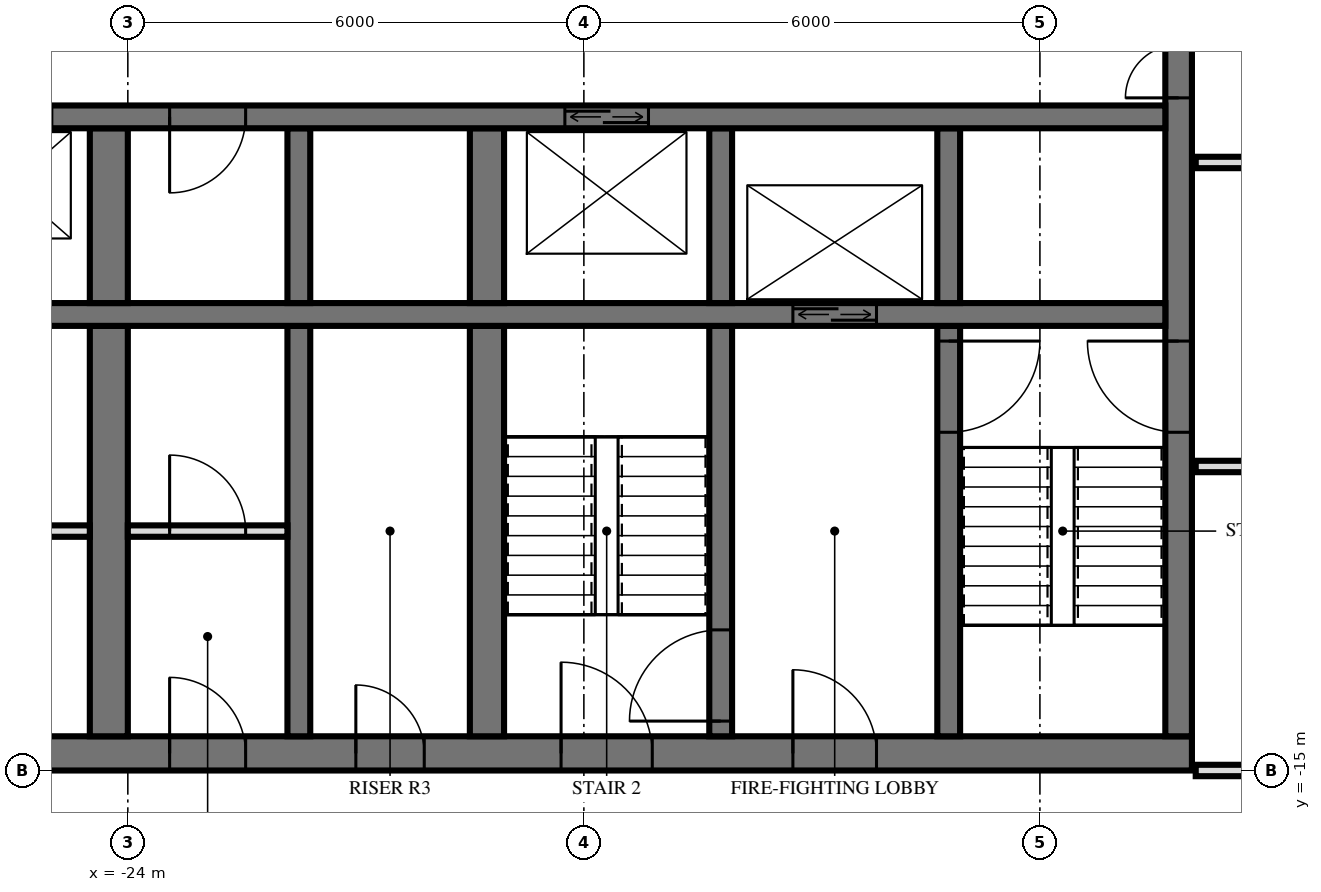
"""IFC4 building model, lengths in metres.
Left out: names, types, materials, properties, quantities, classifications, styles, units other than length and angle.
Written with IfcOpenShell. Run it as: python <this file> out.ifc"""

import sys

from ifc_helpers import new_model, si_unit, direction, frame, frame_2d, origin, place, context, subcontext, project, spatial, rectangle, extrude, element, fill, save


model = new_model("IFC4")
c1 = context("Model", 3, precision=1e-05, world=origin(), true_north=direction((0.0, 1.0)))
c2 = subcontext(c1, "Body", "Model", "MODEL_VIEW")
j1 = project(units=[si_unit("LENGTHUNIT", "METRE"), si_unit("PLANEANGLEUNIT", "RADIAN")], contexts=[c1])
p1 = place(None, origin())
s1 = spatial("IfcSite", under=j1, at=p1, CompositionType="ELEMENT")
p2 = place(p1, origin())
s2 = spatial("IfcBuilding", under=s1, at=p2, CompositionType="ELEMENT")
p3 = place(p2, frame((0.0, 0.0, 63.6)))
s3 = spatial("IfcBuildingStorey", under=s2, at=p3, CompositionType="ELEMENT", Elevation=63.6)
p4 = place(p3, frame((-29.5, -14.775, 0.0), z_axis=(0.0, 0.0, 1.0), x_axis=(1.0, 0.0, 0.0)))
e1 = element("IfcWall", 1, at=p4, inside=s3, PredefinedType="SHEAR", context=c2, shape_type="SweptSolid", body=[
    extrude(rectangle(XDim=19.5, YDim=0.45, at=frame_2d((9.75, 0.0))), origin(), (0.0, 0.0, 1.0), 3.6),
])
p5 = place(p4, frame((11.2, 0.0, 0.0)))
e2 = element("IfcOpeningElement", 2, at=p5, cuts=e1, PredefinedType="OPENING", context=c2, shape_type="SweptSolid", body=[
    extrude(rectangle(XDim=1.2, YDim=2.1, at=frame_2d((0.6, 1.05))), frame((0.0, 0.235, 0.0), z_axis=(0.0, -1.0, 0.0), x_axis=(1.0, 0.0, 0.0)), (0.0, 0.0, 1.0), 0.47),
])
p6 = place(p4, frame((14.25, 0.0, 0.0)))
e3 = element("IfcOpeningElement", 3, at=p6, cuts=e1, PredefinedType="OPENING", context=c2, shape_type="SweptSolid", body=[
    extrude(rectangle(XDim=1.1, YDim=2.1, at=frame_2d((0.55, 1.05))), frame((0.0, 0.235, 0.0), z_axis=(0.0, -1.0, 0.0), x_axis=(1.0, 0.0, 0.0)), (0.0, 0.0, 1.0), 0.47),
])
p7 = place(p4, frame((8.5, 0.0, 0.0)))
e4 = element("IfcOpeningElement", 4, at=p7, cuts=e1, PredefinedType="OPENING", context=c2, shape_type="SweptSolid", body=[
    extrude(rectangle(XDim=0.9, YDim=2.1, at=frame_2d((0.45, 1.05))), frame((0.0, 0.235, 0.0), z_axis=(0.0, -1.0, 0.0), x_axis=(1.0, 0.0, 0.0)), (0.0, 0.0, 1.0), 0.47),
])
p8 = place(p4, frame((6.05, 0.0, 0.0)))
e5 = element("IfcOpeningElement", 5, at=p8, cuts=e1, PredefinedType="OPENING", context=c2, shape_type="SweptSolid", body=[
    extrude(rectangle(XDim=1.0, YDim=2.1, at=frame_2d((0.5, 1.05))), frame((0.0, 0.235, 0.0), z_axis=(0.0, -1.0, 0.0), x_axis=(1.0, 0.0, 0.0)), (0.0, 0.0, 1.0), 0.47),
])
p9 = place(p4, frame((2.25, 0.0, 0.0)))
e6 = element("IfcOpeningElement", 6, at=p9, cuts=e1, PredefinedType="OPENING", context=c2, shape_type="SweptSolid", body=[
    extrude(rectangle(XDim=1.0, YDim=2.1, at=frame_2d((0.5, 1.05))), frame((0.0, 0.235, 0.0), z_axis=(0.0, -1.0, 0.0), x_axis=(1.0, 0.0, 0.0)), (0.0, 0.0, 1.0), 0.47),
])
p10 = place(p3, frame((-10.175, -14.55, 0.0), z_axis=(0.0, 0.0, 1.0), x_axis=(0.0, 1.0, 0.0)))
e7 = element("IfcWall", 7, at=p10, inside=s3, PredefinedType="SHEAR", context=c2, shape_type="SweptSolid", body=[
    extrude(rectangle(XDim=14.1, YDim=0.35, at=frame_2d((7.05, 0.0))), origin(), (0.0, 0.0, 1.0), 3.6),
])
p11 = place(p10, frame((8.4, 0.0, 0.0)))
e8 = element("IfcOpeningElement", 8, at=p11, cuts=e7, PredefinedType="OPENING", context=c2, shape_type="SweptSolid", body=[
    extrude(rectangle(XDim=1.4, YDim=2.4, at=frame_2d((0.7, 1.2))), frame((0.0, 0.185, 0.0), z_axis=(0.0, -1.0, 0.0), x_axis=(1.0, 0.0, 0.0)), (0.0, 0.0, 1.0), 0.37),
])
p12 = place(p10, frame((10.0, 0.0, 0.0)))
e9 = element("IfcOpeningElement", 9, at=p12, cuts=e7, PredefinedType="OPENING", context=c2, shape_type="SweptSolid", body=[
    extrude(rectangle(XDim=1.4, YDim=2.4, at=frame_2d((0.7, 1.2))), frame((0.0, 0.185, 0.0), z_axis=(0.0, -1.0, 0.0), x_axis=(1.0, 0.0, 0.0)), (0.0, 0.0, 1.0), 0.37),
])
p13 = place(p10, frame((4.0, 0.0, 0.0)))
e10 = element("IfcOpeningElement", 10, at=p13, cuts=e7, PredefinedType="OPENING", context=c2, shape_type="SweptSolid", body=[
    extrude(rectangle(XDim=1.2, YDim=2.1, at=frame_2d((0.6, 1.05))), frame((0.0, 0.185, 0.0), z_axis=(0.0, -1.0, 0.0), x_axis=(1.0, 0.0, 0.0)), (0.0, 0.0, 1.0), 0.37),
])
p14 = place(p3, frame((-29.05, -6.4, 0.0), z_axis=(0.0, 0.0, 1.0), x_axis=(1.0, 0.0, 0.0)))
e11 = element("IfcWall", 11, at=p14, inside=s3, PredefinedType="SHEAR", context=c2, shape_type="SweptSolid", body=[
    extrude(rectangle(XDim=18.7, YDim=0.3, at=frame_2d((9.35, 0.0))), origin(), (0.0, 0.0, 1.0), 3.6),
])
p15 = place(p14, frame((2.95, 0.0, 0.0)))
e12 = element("IfcOpeningElement", 12, at=p15, cuts=e11, PredefinedType="OPENING", context=c2, shape_type="SweptSolid", body=[
    extrude(rectangle(XDim=1.1, YDim=2.1, at=frame_2d((0.55, 1.05))), frame((0.0, 0.16, 0.0), z_axis=(0.0, -1.0, 0.0), x_axis=(1.0, 0.0, 0.0)), (0.0, 0.0, 1.0), 0.32),
])
p16 = place(p14, frame((0.55, 0.0, 0.0)))
e13 = element("IfcOpeningElement", 13, at=p16, cuts=e11, PredefinedType="OPENING", context=c2, shape_type="SweptSolid", body=[
    extrude(rectangle(XDim=1.1, YDim=2.1, at=frame_2d((0.55, 1.05))), frame((0.0, 0.16, 0.0), z_axis=(0.0, -1.0, 0.0), x_axis=(1.0, 0.0, 0.0)), (0.0, 0.0, 1.0), 0.32),
])
p17 = place(p14, frame((10.8, 0.0, 0.0)))
e14 = element("IfcOpeningElement", 14, at=p17, cuts=e11, PredefinedType="OPENING", context=c2, shape_type="SweptSolid", body=[
    extrude(rectangle(XDim=1.1, YDim=2.1, at=frame_2d((0.55, 1.05))), frame((0.0, 0.16, 0.0), z_axis=(0.0, -1.0, 0.0), x_axis=(1.0, 0.0, 0.0)), (0.0, 0.0, 1.0), 0.32),
])
p18 = place(p14, frame((5.6, 0.0, 0.0)))
e15 = element("IfcOpeningElement", 15, at=p18, cuts=e11, PredefinedType="OPENING", context=c2, shape_type="SweptSolid", body=[
    extrude(rectangle(XDim=1.0, YDim=2.1, at=frame_2d((0.5, 1.05))), frame((0.0, 0.16, 0.0), z_axis=(0.0, -1.0, 0.0), x_axis=(1.0, 0.0, 0.0)), (0.0, 0.0, 1.0), 0.32),
])
p19 = place(p3, frame((-29.05, -9.0, 0.0), z_axis=(0.0, 0.0, 1.0), x_axis=(1.0, 0.0, 0.0)))
e16 = element("IfcWall", 16, at=p19, inside=s3, PredefinedType="SHEAR", context=c2, shape_type="SweptSolid", body=[
    extrude(rectangle(XDim=18.7, YDim=0.3, at=frame_2d((9.35, 0.0))), origin(), (0.0, 0.0, 1.0), 3.6),
])
p20 = place(p19, frame((13.8, 0.0, 0.0)))
e17 = element("IfcOpeningElement", 17, at=p20, cuts=e16, PredefinedType="OPENING", context=c2, shape_type="SweptSolid", body=[
    extrude(rectangle(XDim=1.1, YDim=2.1, at=frame_2d((0.55, 1.05))), frame((0.0, 0.16, 0.0), z_axis=(0.0, -1.0, 0.0), x_axis=(1.0, 0.0, 0.0)), (0.0, 0.0, 1.0), 0.32),
])
p21 = place(p3, frame((-13.2, -8.85, 0.0), z_axis=(0.0, 0.0, 1.0), x_axis=(0.0, 1.0, 0.0)))
e18 = element("IfcWall", 18, at=p21, inside=s3, PredefinedType="SHEAR", context=c2, shape_type="SweptSolid", body=[
    extrude(rectangle(XDim=2.3, YDim=0.3, at=frame_2d((1.15, 0.0))), origin(), (0.0, 0.0, 1.0), 3.6),
])
p22 = place(p3, frame((-13.2, -14.55, 0.0), z_axis=(0.0, 0.0, 1.0), x_axis=(0.0, 1.0, 0.0)))
e19 = element("IfcWall", 19, at=p22, inside=s3, PredefinedType="SHEAR", context=c2, shape_type="SweptSolid", body=[
    extrude(rectangle(XDim=5.4, YDim=0.3, at=frame_2d((2.7, 0.0))), origin(), (0.0, 0.0, 1.0), 3.6),
])
p23 = place(p22, frame((4.0, 0.0, 0.0)))
e20 = element("IfcOpeningElement", 20, at=p23, cuts=e19, PredefinedType="OPENING", context=c2, shape_type="SweptSolid", body=[
    extrude(rectangle(XDim=1.2, YDim=2.1, at=frame_2d((0.6, 1.05))), frame((0.0, 0.16, 0.0), z_axis=(0.0, -1.0, 0.0), x_axis=(1.0, 0.0, 0.0)), (0.0, 0.0, 1.0), 0.32),
])
p24 = place(p3, frame((-16.2, -8.85, 0.0), z_axis=(0.0, 0.0, 1.0), x_axis=(0.0, 1.0, 0.0)))
e21 = element("IfcWall", 21, at=p24, inside=s3, PredefinedType="SHEAR", context=c2, shape_type="SweptSolid", body=[
    extrude(rectangle(XDim=2.3, YDim=0.3, at=frame_2d((1.15, 0.0))), origin(), (0.0, 0.0, 1.0), 3.6),
])
p25 = place(p3, frame((-16.2, -14.55, 0.0), z_axis=(0.0, 0.0, 1.0), x_axis=(0.0, 1.0, 0.0)))
e22 = element("IfcWall", 22, at=p25, inside=s3, PredefinedType="SHEAR", context=c2, shape_type="SweptSolid", body=[
    extrude(rectangle(XDim=5.4, YDim=0.3, at=frame_2d((2.7, 0.0))), origin(), (0.0, 0.0, 1.0), 3.6),
])
p26 = place(p25, frame((0.2, 0.0, 0.0)))
e23 = element("IfcOpeningElement", 23, at=p26, cuts=e22, PredefinedType="OPENING", context=c2, shape_type="SweptSolid", body=[
    extrude(rectangle(XDim=1.2, YDim=2.1, at=frame_2d((0.6, 1.05))), frame((0.0, 0.16, 0.0), z_axis=(0.0, -1.0, 0.0), x_axis=(1.0, 0.0, 0.0)), (0.0, 0.0, 1.0), 0.32),
])
p27 = place(p3, frame((-19.275, -8.85, 0.0), z_axis=(0.0, 0.0, 1.0), x_axis=(0.0, 1.0, 0.0)))
e24 = element("IfcWall", 24, at=p27, inside=s3, PredefinedType="SHEAR", context=c2, shape_type="SweptSolid", body=[
    extrude(rectangle(XDim=2.3, YDim=0.45, at=frame_2d((1.15, 0.0))), origin(), (0.0, 0.0, 1.0), 3.6),
])
p28 = place(p3, frame((-19.275, -14.55, 0.0), z_axis=(0.0, 0.0, 1.0), x_axis=(0.0, 1.0, 0.0)))
e25 = element("IfcWall", 25, at=p28, inside=s3, PredefinedType="SHEAR", context=c2, shape_type="SweptSolid", body=[
    extrude(rectangle(XDim=5.4, YDim=0.45, at=frame_2d((2.7, 0.0))), origin(), (0.0, 0.0, 1.0), 3.6),
])
p29 = place(p3, frame((-21.75, -8.85, 0.0), z_axis=(0.0, 0.0, 1.0), x_axis=(0.0, 1.0, 0.0)))
e26 = element("IfcWall", 26, at=p29, inside=s3, PredefinedType="SHEAR", context=c2, shape_type="SweptSolid", body=[
    extrude(rectangle(XDim=2.3, YDim=0.3, at=frame_2d((1.15, 0.0))), origin(), (0.0, 0.0, 1.0), 3.6),
])
p30 = place(p3, frame((-21.75, -14.55, 0.0), z_axis=(0.0, 0.0, 1.0), x_axis=(0.0, 1.0, 0.0)))
e27 = element("IfcWall", 27, at=p30, inside=s3, PredefinedType="SHEAR", context=c2, shape_type="SweptSolid", body=[
    extrude(rectangle(XDim=5.4, YDim=0.3, at=frame_2d((2.7, 0.0))), origin(), (0.0, 0.0, 1.0), 3.6),
])
p31 = place(p3, frame((-24.25, -8.85, 0.0), z_axis=(0.0, 0.0, 1.0), x_axis=(0.0, 1.0, 0.0)))
e28 = element("IfcWall", 28, at=p31, inside=s3, PredefinedType="SHEAR", context=c2, shape_type="SweptSolid", body=[
    extrude(rectangle(XDim=2.3, YDim=0.5, at=frame_2d((1.15, 0.0))), origin(), (0.0, 0.0, 1.0), 3.6),
])
p32 = place(p3, frame((-24.25, -14.55, 0.0), z_axis=(0.0, 0.0, 1.0), x_axis=(0.0, 1.0, 0.0)))
e29 = element("IfcWall", 29, at=p32, inside=s3, PredefinedType="SHEAR", context=c2, shape_type="SweptSolid", body=[
    extrude(rectangle(XDim=5.4, YDim=0.5, at=frame_2d((2.7, 0.0))), origin(), (0.0, 0.0, 1.0), 3.6),
])
p33 = place(p3, frame((-24.0, -11.85, 0.0), z_axis=(0.0, 0.0, 1.0), x_axis=(1.0, 0.0, 0.0)))
e30 = element("IfcWall", 30, at=p33, inside=s3, PredefinedType="PARTITIONING", context=c2, shape_type="SweptSolid", body=[
    extrude(rectangle(XDim=2.1, YDim=0.15, at=frame_2d((1.05, 0.0))), origin(), (0.0, 0.0, 1.0), 3.3),
])
p34 = place(p33, frame((0.55, 0.0, 0.0)))
e31 = element("IfcOpeningElement", 31, at=p34, cuts=e30, PredefinedType="OPENING", context=c2, shape_type="SweptSolid", body=[
    extrude(rectangle(XDim=1.0, YDim=2.1, at=frame_2d((0.5, 1.05))), frame((0.0, 0.085, 0.0), z_axis=(0.0, -1.0, 0.0), x_axis=(1.0, 0.0, 0.0)), (0.0, 0.0, 1.0), 0.17),
])
p35 = place(p3, frame((-29.0, -11.85, 0.0), z_axis=(0.0, 0.0, 1.0), x_axis=(1.0, 0.0, 0.0)))
e32 = element("IfcWall", 32, at=p35, inside=s3, PredefinedType="PARTITIONING", context=c2, shape_type="SweptSolid", body=[
    extrude(rectangle(XDim=4.5, YDim=0.15, at=frame_2d((2.25, 0.0))), origin(), (0.0, 0.0, 1.0), 3.3),
])
p36 = place(p35, frame((1.75, 0.0, 0.0)))
e33 = element("IfcOpeningElement", 33, at=p36, cuts=e32, PredefinedType="OPENING", context=c2, shape_type="SweptSolid", body=[
    extrude(rectangle(XDim=1.0, YDim=2.1, at=frame_2d((0.5, 1.05))), frame((0.0, 0.085, 0.0), z_axis=(0.0, -1.0, 0.0), x_axis=(1.0, 0.0, 0.0)), (0.0, 0.0, 1.0), 0.17),
])
p37 = place(p3, frame((-9.95, -15.0, 0.0), z_axis=(0.0, 0.0, 1.0), x_axis=(1.0, 0.0, 0.0)))
e34 = element("IfcWall", 34, at=p37, inside=s3, PredefinedType="PARTITIONING", context=c2, shape_type="SweptSolid", body=[
    extrude(rectangle(XDim=19.9, YDim=0.15, at=frame_2d((9.95, 0.0))), origin(), (0.0, 0.0, 1.0), 2.684),
])
p38 = place(p37, frame((9.45, 0.0, 0.0)))
e35 = element("IfcOpeningElement", 35, at=p38, cuts=e34, PredefinedType="OPENING", context=c2, shape_type="SweptSolid", body=[
    extrude(rectangle(XDim=1.0, YDim=2.1, at=frame_2d((0.5, 1.05))), frame((0.0, 0.085, 0.0), z_axis=(0.0, -1.0, 0.0), x_axis=(1.0, 0.0, 0.0)), (0.0, 0.0, 1.0), 0.17),
])
p39 = place(p3, frame((-9.95, -11.0, 0.0), z_axis=(0.0, 0.0, 1.0), x_axis=(1.0, 0.0, 0.0)))
e36 = element("IfcWall", 36, at=p39, inside=s3, PredefinedType="PARTITIONING", context=c2, shape_type="SweptSolid", body=[
    extrude(rectangle(XDim=19.9, YDim=0.15, at=frame_2d((9.95, 0.0))), origin(), (0.0, 0.0, 1.0), 3.32),
])
p40 = place(p39, frame((9.45, 0.0, 0.0)))
e37 = element("IfcOpeningElement", 37, at=p40, cuts=e36, PredefinedType="OPENING", context=c2, shape_type="SweptSolid", body=[
    extrude(rectangle(XDim=1.0, YDim=2.1, at=frame_2d((0.5, 1.05))), frame((0.0, 0.085, 0.0), z_axis=(0.0, -1.0, 0.0), x_axis=(1.0, 0.0, 0.0)), (0.0, 0.0, 1.0), 0.17),
])
p41 = place(p39, frame((3.45, 0.0, 0.0)))
e38 = element("IfcOpeningElement", 38, at=p41, cuts=e36, PredefinedType="OPENING", context=c2, shape_type="SweptSolid", body=[
    extrude(rectangle(XDim=1.0, YDim=2.1, at=frame_2d((0.5, 1.05))), frame((0.0, 0.085, 0.0), z_axis=(0.0, -1.0, 0.0), x_axis=(1.0, 0.0, 0.0)), (0.0, 0.0, 1.0), 0.17),
])
p42 = place(p3, frame((-9.95, -7.0, 0.0), z_axis=(0.0, 0.0, 1.0), x_axis=(1.0, 0.0, 0.0)))
e39 = element("IfcWall", 39, at=p42, inside=s3, PredefinedType="PARTITIONING", context=c2, shape_type="SweptSolid", body=[
    extrude(rectangle(XDim=19.9, YDim=0.15, at=frame_2d((9.95, 0.0))), origin(), (0.0, 0.0, 1.0), 3.32),
])
p43 = place(p42, frame((9.45, 0.0, 0.0)))
e40 = element("IfcOpeningElement", 40, at=p43, cuts=e39, PredefinedType="OPENING", context=c2, shape_type="SweptSolid", body=[
    extrude(rectangle(XDim=1.0, YDim=2.1, at=frame_2d((0.5, 1.05))), frame((0.0, 0.085, 0.0), z_axis=(0.0, -1.0, 0.0), x_axis=(1.0, 0.0, 0.0)), (0.0, 0.0, 1.0), 0.17),
])
p44 = place(p42, frame((15.45, 0.0, 0.0)))
e41 = element("IfcOpeningElement", 41, at=p44, cuts=e39, PredefinedType="OPENING", context=c2, shape_type="SweptSolid", body=[
    extrude(rectangle(XDim=1.0, YDim=2.1, at=frame_2d((0.5, 1.05))), frame((0.0, 0.085, 0.0), z_axis=(0.0, -1.0, 0.0), x_axis=(1.0, 0.0, 0.0)), (0.0, 0.0, 1.0), 0.17),
])
p45 = place(p20, origin())
e42 = element("IfcDoor", 42, at=p45, inside=s3, OperationType="DOUBLE_DOOR_SLIDING", PredefinedType="USERDEFINED", context=c2, shape_type="SweptSolid", body=[
    extrude(rectangle(XDim=1.1, YDim=2.1, at=frame_2d((0.55, 1.05))), frame((0.0, 0.025, 0.0), z_axis=(0.0, -1.0, 0.0), x_axis=(1.0, 0.0, 0.0)), (0.0, 0.0, 1.0), 0.05),
])
fill(e17, e42)
p46 = place(p17, origin())
e43 = element("IfcDoor", 43, at=p46, inside=s3, OperationType="DOUBLE_DOOR_SLIDING", PredefinedType="USERDEFINED", context=c2, shape_type="SweptSolid", body=[
    extrude(rectangle(XDim=1.1, YDim=2.1, at=frame_2d((0.55, 1.05))), frame((0.0, 0.025, 0.0), z_axis=(0.0, -1.0, 0.0), x_axis=(1.0, 0.0, 0.0)), (0.0, 0.0, 1.0), 0.05),
])
fill(e14, e43)
p47 = place(p11, origin())
e44 = element("IfcDoor", 44, at=p47, inside=s3, OperationType="DOUBLE_DOOR_SINGLE_SWING", PredefinedType="DOOR", context=c2, shape_type="SweptSolid", body=[
    extrude(rectangle(XDim=1.4, YDim=2.4, at=frame_2d((0.7, 1.2))), frame((0.0, 0.025, 0.0), z_axis=(0.0, -1.0, 0.0), x_axis=(1.0, 0.0, 0.0)), (0.0, 0.0, 1.0), 0.05),
])
fill(e8, e44)
p48 = place(p13, origin())
e45 = element("IfcDoor", 45, at=p48, inside=s3, OperationType="SINGLE_SWING_LEFT", PredefinedType="DOOR", context=c2, shape_type="SweptSolid", body=[
    extrude(rectangle(XDim=1.2, YDim=2.1, at=frame_2d((0.6, 1.05))), frame((0.0, 0.025, 0.0), z_axis=(0.0, -1.0, 0.0), x_axis=(1.0, 0.0, 0.0)), (0.0, 0.0, 1.0), 0.05),
])
fill(e10, e45)
p49 = place(p5, origin())
e46 = element("IfcDoor", 46, at=p49, inside=s3, OperationType="SINGLE_SWING_RIGHT", PredefinedType="DOOR", context=c2, shape_type="SweptSolid", body=[
    extrude(rectangle(XDim=1.2, YDim=2.1, at=frame_2d((0.6, 1.05))), frame((0.0, 0.025, 0.0), z_axis=(0.0, -1.0, 0.0), x_axis=(1.0, 0.0, 0.0)), (0.0, 0.0, 1.0), 0.05),
])
fill(e2, e46)
p50 = place(p6, origin())
e47 = element("IfcDoor", 47, at=p50, inside=s3, OperationType="SINGLE_SWING_RIGHT", PredefinedType="DOOR", context=c2, shape_type="SweptSolid", body=[
    extrude(rectangle(XDim=1.1, YDim=2.1, at=frame_2d((0.55, 1.05))), frame((0.0, 0.025, 0.0), z_axis=(0.0, -1.0, 0.0), x_axis=(1.0, 0.0, 0.0)), (0.0, 0.0, 1.0), 0.05),
])
fill(e3, e47)
p51 = place(p7, origin())
e48 = element("IfcDoor", 48, at=p51, inside=s3, OperationType="SINGLE_SWING_RIGHT", PredefinedType="DOOR", context=c2, shape_type="SweptSolid", body=[
    extrude(rectangle(XDim=0.9, YDim=2.1, at=frame_2d((0.45, 1.05))), frame((0.0, 0.025, 0.0), z_axis=(0.0, -1.0, 0.0), x_axis=(1.0, 0.0, 0.0)), (0.0, 0.0, 1.0), 0.05),
])
fill(e4, e48)
p52 = place(p8, origin())
e49 = element("IfcDoor", 49, at=p52, inside=s3, OperationType="SINGLE_SWING_RIGHT", PredefinedType="DOOR", context=c2, shape_type="SweptSolid", body=[
    extrude(rectangle(XDim=1.0, YDim=2.1, at=frame_2d((0.5, 1.05))), frame((0.0, 0.025, 0.0), z_axis=(0.0, -1.0, 0.0), x_axis=(1.0, 0.0, 0.0)), (0.0, 0.0, 1.0), 0.05),
])
fill(e5, e49)
p53 = place(p18, frame((0.5, 0.0, 0.0), z_axis=(0.0, 0.0, 1.0), x_axis=(-1.0, 0.0, 0.0)))
e50 = element("IfcDoor", 50, at=p53, inside=s3, OperationType="SINGLE_SWING_LEFT", PredefinedType="DOOR", context=c2, shape_type="SweptSolid", body=[
    extrude(rectangle(XDim=1.0, YDim=2.1, at=frame_2d((0.0, 1.05))), frame((0.0, -0.025, 0.0), z_axis=(0.0, 1.0, 0.0), x_axis=(-1.0, 0.0, 0.0)), (0.0, 0.0, 1.0), 0.05),
])
fill(e15, e50)
p54 = place(p23, frame((0.6, 0.0, 0.0), z_axis=(0.0, 0.0, 1.0), x_axis=(-1.0, 0.0, 0.0)))
e51 = element("IfcDoor", 51, at=p54, inside=s3, OperationType="SINGLE_SWING_RIGHT", PredefinedType="DOOR", context=c2, shape_type="SweptSolid", body=[
    extrude(rectangle(XDim=1.2, YDim=2.1, at=frame_2d((0.0, 1.05))), frame((0.0, -0.025, 0.0), z_axis=(0.0, 1.0, 0.0), x_axis=(-1.0, 0.0, 0.0)), (0.0, 0.0, 1.0), 0.05),
])
fill(e20, e51)
p55 = place(p26, origin())
e52 = element("IfcDoor", 52, at=p55, inside=s3, OperationType="SINGLE_SWING_RIGHT", PredefinedType="DOOR", context=c2, shape_type="SweptSolid", body=[
    extrude(rectangle(XDim=1.2, YDim=2.1, at=frame_2d((0.6, 1.05))), frame((0.0, 0.025, 0.0), z_axis=(0.0, -1.0, 0.0), x_axis=(1.0, 0.0, 0.0)), (0.0, 0.0, 1.0), 0.05),
])
fill(e23, e52)
p56 = place(p34, origin())
e53 = element("IfcDoor", 53, at=p56, inside=s3, OperationType="SINGLE_SWING_RIGHT", PredefinedType="DOOR", context=c2, shape_type="SweptSolid", body=[
    extrude(rectangle(XDim=1.0, YDim=2.1, at=frame_2d((0.5, 1.05))), frame((0.0, 0.025, 0.0), z_axis=(0.0, -1.0, 0.0), x_axis=(1.0, 0.0, 0.0)), (0.0, 0.0, 1.0), 0.05),
])
fill(e31, e53)
save(model, sys.argv[1])
